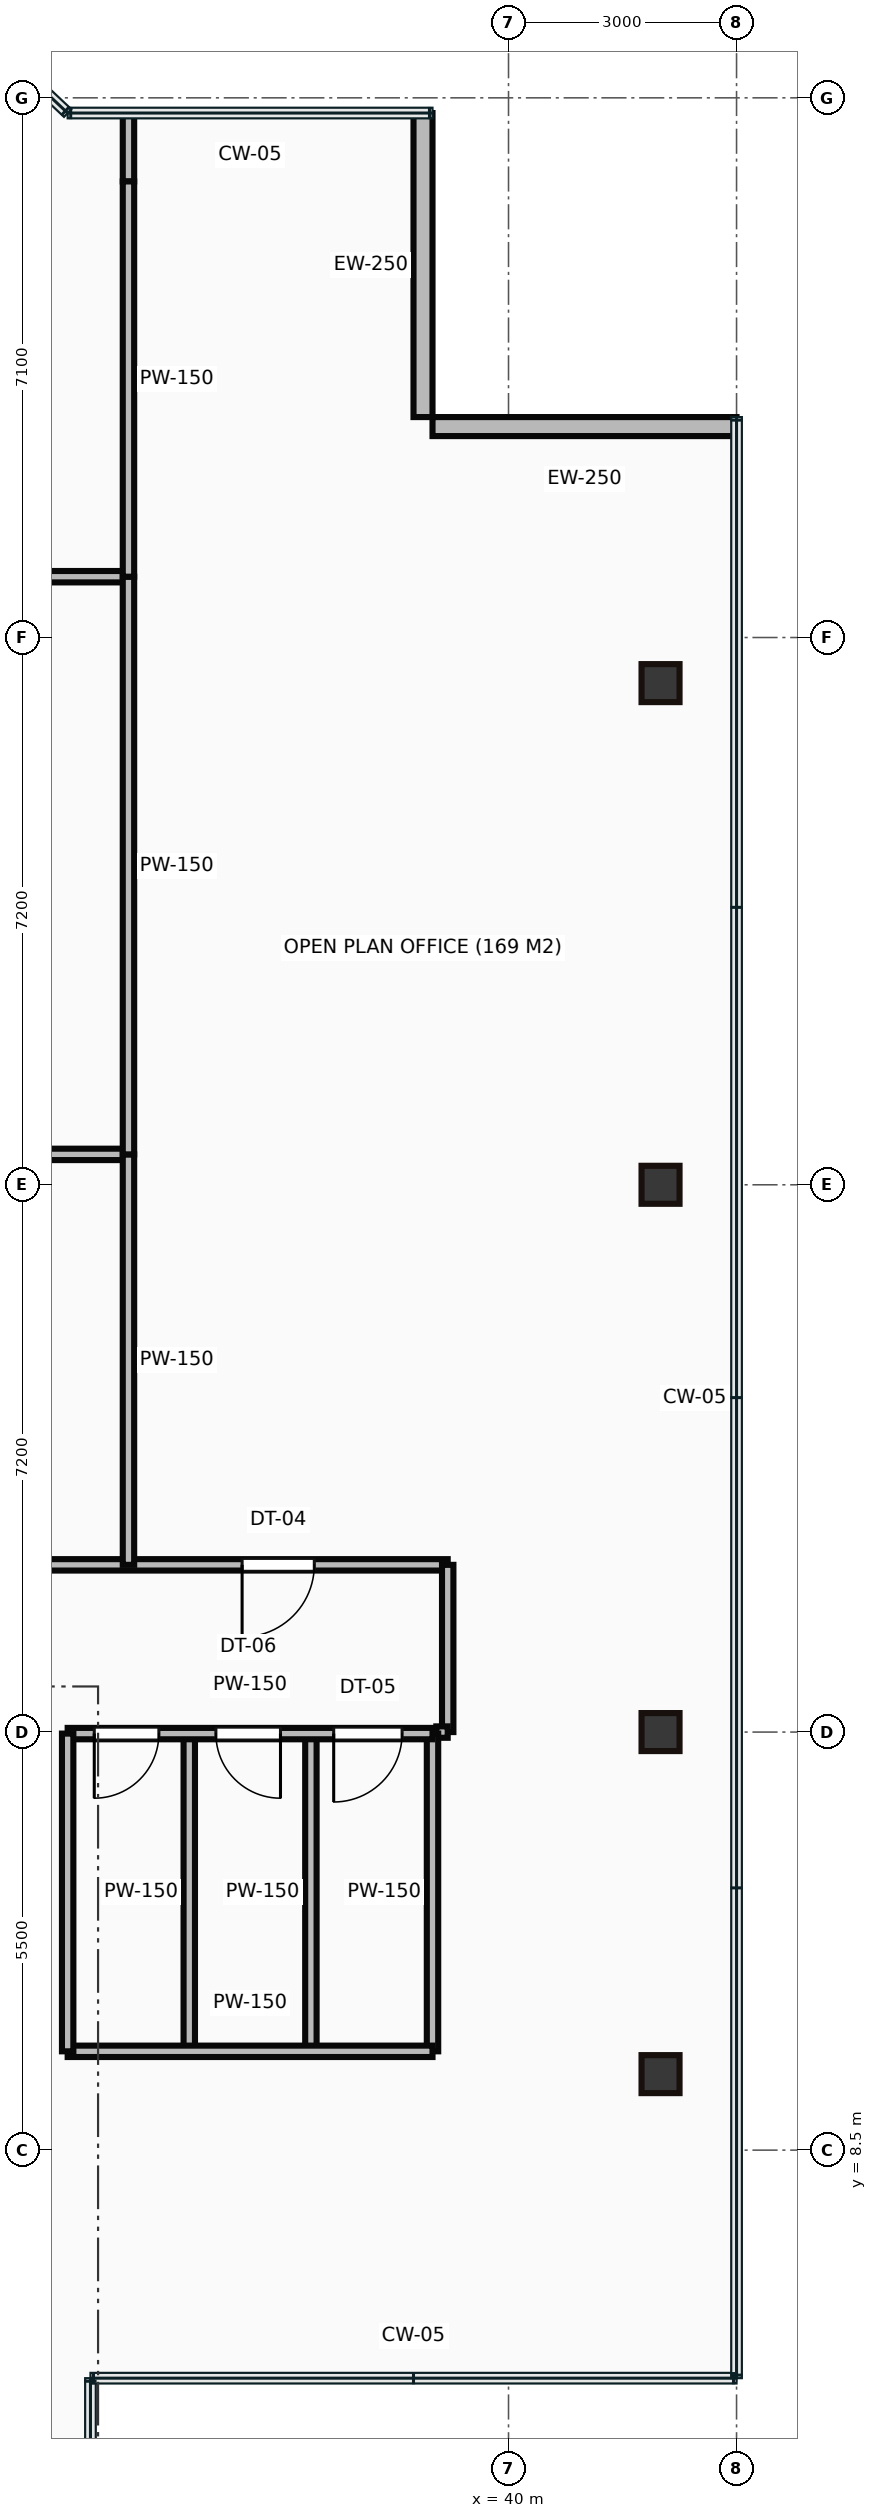
"""IFC4 building model, lengths in metres.
Left out: names, types, materials, properties, quantities, classifications, styles, units other than length and angle.
Written with IfcOpenShell. Run it as: python <this file> out.ifc"""

import sys

from ifc_helpers import new_model, si_unit, direction, frame, frame_2d, origin, origin_2d, place, context, subcontext, project, spatial, rectangle, hollow_rectangle, extrude, source, transform, mapped, element, fill, save


model = new_model("IFC4")
c1 = context("Model", 3, precision=1e-05, world=origin(), true_north=direction((0.0, 1.0)))
c2 = subcontext(c1, "Body", "Model", "MODEL_VIEW")
j1 = project(units=[si_unit("LENGTHUNIT", "METRE"), si_unit("PLANEANGLEUNIT", "RADIAN")], contexts=[c1])
p1 = place(None, origin())
s1 = spatial("IfcSite", under=j1, at=p1, CompositionType="ELEMENT")
p2 = place(p1, origin())
s2 = spatial("IfcBuilding", under=s1, at=p2, CompositionType="ELEMENT")
p3 = place(p2, frame((0.0, 0.0, 277.05)))
s3 = spatial("IfcBuildingStorey", under=s2, at=p3, CompositionType="ELEMENT", Elevation=277.05)
m1 = source(origin(), c2, "Body", "SweptSolid", [
    extrude(hollow_rectangle(XDim=0.5, YDim=0.5, WallThickness=0.022, at=origin_2d()), origin(), (0.0, 0.0, 1.0), 3.65),
])
for number, where, z_axis, x_axis in (
    (1, (42.0, 9.5, 0.0), (0.0, 0.0, 1.0), (1.0, 0.0, 0.0)),
    (2, (42.0, 14.0, 0.0), (0.0, 0.0, 1.0), (1.0, 0.0, 0.0)),
    (3, (42.0, 21.2, 0.0), (0.0, 0.0, 1.0), (1.0, 0.0, 0.0)),
    (4, (42.0, 27.8, 0.0), (0.0, 0.0, 1.0), (1.0, 0.0, 0.0)),
):
    element("IfcColumn", number, at=place(p3, frame(where, z_axis=z_axis, x_axis=x_axis)), inside=s3, PredefinedType="COLUMN", context=c2, shape_type="MappedRepresentation", body=[
        mapped(m1, transform((0.0, 0.0, 0.0))),
    ])
m2 = source(origin(), c2, "Body", "SweptSolid", [
    extrude(rectangle(XDim=4.0, YDim=0.25, at=frame_2d((2.0, 0.0))), origin(), (0.0, 0.0, 1.0), 3.4),
])
for number, where, z_axis, x_axis in (
    (5, (43.0, 31.175, 0.0), (0.0, 0.0, 1.0), (-1.0, 0.0, 0.0)),
    (6, (38.875, 31.3, 0.0), (0.0, 0.0, 1.0), (0.0, 1.0, 0.0)),
):
    element("IfcWall", number, at=place(p3, frame(where, z_axis=z_axis, x_axis=x_axis)), inside=s3, PredefinedType="STANDARD", context=c2, shape_type="MappedRepresentation", body=[
        mapped(m2, transform((0.0, 0.0, 0.0))),
    ])
m3 = source(origin(), c2, "Body", "SweptSolid", [
    extrude(rectangle(XDim=4.8, YDim=0.15, at=frame_2d((2.4, 0.0))), origin(), (0.0, 0.0, 1.0), 2.787),
])
p4 = place(p3, frame((34.2, 13.98, 0.0), z_axis=(0.0, 0.0, 1.0), x_axis=(1.0, 0.0, 0.0)))
e7 = element("IfcWall", 7, at=p4, inside=s3, PredefinedType="PARTITIONING", context=c2, shape_type="MappedRepresentation", body=[
    mapped(m3, transform((0.0, 0.0, 0.0))),
])
p5 = place(p4, frame((0.35, 0.0, 0.0)))
e8 = element("IfcOpeningElement", 8, at=p5, cuts=e7, PredefinedType="OPENING", context=c2, shape_type="SweptSolid", body=[
    extrude(rectangle(XDim=0.85, YDim=2.1, at=frame_2d((0.425, 1.05))), frame((0.0, 0.085, 0.0), z_axis=(0.0, -1.0, 0.0), x_axis=(1.0, 0.0, 0.0)), (0.0, 0.0, 1.0), 0.17),
])
p6 = place(p4, frame((1.95, 0.0, 0.0)))
e9 = element("IfcOpeningElement", 9, at=p6, cuts=e7, PredefinedType="OPENING", context=c2, shape_type="SweptSolid", body=[
    extrude(rectangle(XDim=0.85, YDim=2.1, at=frame_2d((0.425, 1.05))), frame((0.0, 0.085, 0.0), z_axis=(0.0, -1.0, 0.0), x_axis=(1.0, 0.0, 0.0)), (0.0, 0.0, 1.0), 0.17),
])
p7 = place(p4, frame((3.5, 0.0, 0.0)))
e10 = element("IfcOpeningElement", 10, at=p7, cuts=e7, PredefinedType="OPENING", context=c2, shape_type="SweptSolid", body=[
    extrude(rectangle(XDim=0.9, YDim=2.1, at=frame_2d((0.45, 1.05))), frame((0.0, 0.085, 0.0), z_axis=(0.0, -1.0, 0.0), x_axis=(1.0, 0.0, 0.0)), (0.0, 0.0, 1.0), 0.17),
])
m4 = source(origin(), c2, "Body", "SweptSolid", [
    extrude(rectangle(XDim=4.8, YDim=0.15, at=frame_2d((2.4, 0.0))), origin(), (0.0, 0.0, 1.0), 3.4),
])
p8 = place(p3, frame((34.2, 9.8, 0.0), z_axis=(0.0, 0.0, 1.0), x_axis=(1.0, 0.0, 0.0)))
e11 = element("IfcWall", 11, at=p8, inside=s3, PredefinedType="PARTITIONING", context=c2, shape_type="MappedRepresentation", body=[
    mapped(m4, transform((0.0, 0.0, 0.0))),
])
m5 = source(origin(), c2, "Body", "SweptSolid", [
    extrude(rectangle(XDim=4.18, YDim=0.15, at=frame_2d((2.09, 0.0))), origin(), (0.0, 0.0, 1.0), 3.4),
])
for number, where, z_axis, x_axis in (
    (12, (39.0, 9.8, 0.0), (0.0, 0.0, 1.0), (0.0, 1.0, 0.0)),
    (13, (34.2, 9.8, 0.0), (0.0, 0.0, 1.0), (0.0, 1.0, 0.0)),
    (14, (35.8, 9.8, 0.0), (0.0, 0.0, 1.0), (0.0, 1.0, 0.0)),
    (15, (37.4, 9.8, 0.0), (0.0, 0.0, 1.0), (0.0, 1.0, 0.0)),
):
    element("IfcWall", number, at=place(p3, frame(where, z_axis=z_axis, x_axis=x_axis)), inside=s3, PredefinedType="PARTITIONING", context=c2, shape_type="MappedRepresentation", body=[
        mapped(m5, transform((0.0, 0.0, 0.0))),
    ])
m6 = source(origin(), c2, "Body", "SweptSolid", [
    extrude(rectangle(XDim=13.45, YDim=0.15, at=frame_2d((6.725, 0.0))), origin(), (0.0, 0.0, 1.0), 3.4),
])
p9 = place(p3, frame((25.75, 16.2, 0.0), z_axis=(0.0, 0.0, 1.0), x_axis=(1.0, 0.0, 0.0)))
e16 = element("IfcWall", 16, at=p9, inside=s3, PredefinedType="PARTITIONING", context=c2, shape_type="MappedRepresentation", body=[
    mapped(m6, transform((0.0, 0.0, 0.0))),
])
p10 = place(p9, frame((4.28, 0.0, 0.0)))
e17 = element("IfcOpeningElement", 17, at=p10, cuts=e16, PredefinedType="OPENING", context=c2, shape_type="SweptSolid", body=[
    extrude(rectangle(XDim=0.95, YDim=2.15, at=frame_2d((0.475, 1.075))), frame((0.0, 0.085, 0.0), z_axis=(0.0, -1.0, 0.0), x_axis=(1.0, 0.0, 0.0)), (0.0, 0.0, 1.0), 0.17),
])
p11 = place(p9, frame((10.745, 0.0, 0.0)))
e18 = element("IfcOpeningElement", 18, at=p11, cuts=e16, PredefinedType="OPENING", context=c2, shape_type="SweptSolid", body=[
    extrude(rectangle(XDim=0.95, YDim=2.15, at=frame_2d((0.475, 1.075))), frame((0.0, 0.085, 0.0), z_axis=(0.0, -1.0, 0.0), x_axis=(1.0, 0.0, 0.0)), (0.0, 0.0, 1.0), 0.17),
])
m7 = source(origin(), c2, "Body", "SweptSolid", [
    extrude(rectangle(XDim=2.2, YDim=0.15, at=frame_2d((1.1, 0.0))), origin(), (0.0, 0.0, 1.0), 3.4),
])
p12 = place(p3, frame((39.2, 16.2, 0.0), z_axis=(0.0, 0.0, 1.0), x_axis=(0.0, -1.0, 0.0)))
e19 = element("IfcWall", 19, at=p12, inside=s3, PredefinedType="PARTITIONING", context=c2, shape_type="MappedRepresentation", body=[
    mapped(m7, transform((0.0, 0.0, 0.0))),
])
m8 = source(origin(), c2, "Body", "SweptSolid", [
    extrude(rectangle(XDim=0.15, YDim=0.15, at=frame_2d((0.075, 0.0))), origin(), (0.0, 0.0, 1.0), 3.4),
])
p13 = place(p3, frame((39.2, 14.0, 0.0), z_axis=(0.0, 0.0, 1.0), x_axis=(-1.0, 0.0, 0.0)))
e20 = element("IfcWall", 20, at=p13, inside=s3, PredefinedType="PARTITIONING", context=c2, shape_type="MappedRepresentation", body=[
    mapped(m8, transform((0.0, 0.0, 0.0))),
])
m9 = source(origin(), c2, "Body", "SweptSolid", [
    extrude(rectangle(XDim=9.25, YDim=0.15, at=frame_2d((4.625, 0.0))), origin(), (0.0, 0.0, 1.0), 3.4),
])
for number, where, z_axis, x_axis in (
    (21, (25.75, 21.6, 0.0), (0.0, 0.0, 1.0), (1.0, 0.0, 0.0)),
    (22, (35.0, 29.2, 0.0), (0.0, 0.0, 1.0), (-1.0, 0.0, 0.0)),
):
    element("IfcWall", number, at=place(p3, frame(where, z_axis=z_axis, x_axis=x_axis)), inside=s3, PredefinedType="PARTITIONING", context=c2, shape_type="MappedRepresentation", body=[
        mapped(m9, transform((0.0, 0.0, 0.0))),
    ])
m10 = source(origin(), c2, "Body", "SweptSolid", [
    extrude(rectangle(XDim=5.4, YDim=0.15, at=frame_2d((2.7, 0.0))), origin(), (0.0, 0.0, 1.0), 3.4),
])
p14 = place(p3, frame((35.0, 21.6, 0.0), z_axis=(0.0, 0.0, 1.0), x_axis=(0.0, -1.0, 0.0)))
e23 = element("IfcWall", 23, at=p14, inside=s3, PredefinedType="PARTITIONING", context=c2, shape_type="MappedRepresentation", body=[
    mapped(m10, transform((0.0, 0.0, 0.0))),
])
m11 = source(origin(), c2, "Body", "SweptSolid", [
    extrude(rectangle(XDim=7.6, YDim=0.15, at=frame_2d((3.8, 0.0))), origin(), (0.0, 0.0, 1.0), 3.4),
])
p15 = place(p3, frame((35.0, 29.2, 0.0), z_axis=(0.0, 0.0, 1.0), x_axis=(0.0, -1.0, 0.0)))
e24 = element("IfcWall", 24, at=p15, inside=s3, PredefinedType="PARTITIONING", context=c2, shape_type="MappedRepresentation", body=[
    mapped(m11, transform((0.0, 0.0, 0.0))),
])
m12 = source(origin(), c2, "Body", "SweptSolid", [
    extrude(rectangle(XDim=0.88, YDim=0.15, at=frame_2d((0.44, 0.0))), origin(), (0.0, 0.0, 1.0), 3.4),
])
p16 = place(p3, frame((35.0, 35.28, 0.0), z_axis=(0.0, 0.0, 1.0), x_axis=(0.0, -1.0, 0.0)))
e25 = element("IfcWall", 25, at=p16, inside=s3, PredefinedType="PARTITIONING", context=c2, shape_type="MappedRepresentation", body=[
    mapped(m12, transform((0.0, 0.0, 0.0))),
])
m13 = source(origin(), c2, "Body", "SweptSolid", [
    extrude(rectangle(XDim=5.2, YDim=0.15, at=frame_2d((2.6, 0.0))), origin(), (0.0, 0.0, 1.0), 3.4),
])
p17 = place(p3, frame((35.0, 34.4, 0.0), z_axis=(0.0, 0.0, 1.0), x_axis=(0.0, -1.0, 0.0)))
e26 = element("IfcWall", 26, at=p17, inside=s3, PredefinedType="PARTITIONING", context=c2, shape_type="MappedRepresentation", body=[
    mapped(m13, transform((0.0, 0.0, 0.0))),
])
m14 = source(origin(), c2, "Body", "SweptSolid", [
    extrude(rectangle(XDim=0.85, YDim=2.1, at=frame_2d((0.425, 1.05))), frame((0.0, 0.025, 0.0), z_axis=(0.0, -1.0, 0.0), x_axis=(1.0, 0.0, 0.0)), (0.0, 0.0, 1.0), 0.05),
])
p18 = place(p5, frame((0.85, 0.0, 0.0), z_axis=(0.0, 0.0, 1.0), x_axis=(-1.0, 0.0, 0.0)))
e27 = element("IfcDoor", 27, at=p18, inside=s3, OperationType="SINGLE_SWING_LEFT", PredefinedType="DOOR", context=c2, shape_type="MappedRepresentation", body=[
    mapped(m14, transform((0.0, 0.0, 0.0))),
])
fill(e8, e27)
p19 = place(p6, frame((0.85, 0.0, 0.0), z_axis=(0.0, 0.0, 1.0), x_axis=(-1.0, 0.0, 0.0)))
e28 = element("IfcDoor", 28, at=p19, inside=s3, OperationType="SINGLE_SWING_RIGHT", PredefinedType="DOOR", context=c2, shape_type="MappedRepresentation", body=[
    mapped(m14, transform((0.0, 0.0, 0.0))),
])
fill(e9, e28)
m15 = source(origin(), c2, "Body", "SweptSolid", [
    extrude(rectangle(XDim=0.9, YDim=2.1, at=frame_2d((0.45, 1.05))), frame((0.0, 0.025, 0.0), z_axis=(0.0, -1.0, 0.0), x_axis=(1.0, 0.0, 0.0)), (0.0, 0.0, 1.0), 0.05),
])
p20 = place(p7, frame((0.9, 0.0, 0.0), z_axis=(0.0, 0.0, 1.0), x_axis=(-1.0, 0.0, 0.0)))
e29 = element("IfcDoor", 29, at=p20, inside=s3, OperationType="SINGLE_SWING_LEFT", PredefinedType="DOOR", context=c2, shape_type="MappedRepresentation", body=[
    mapped(m15, transform((0.0, 0.0, 0.0))),
])
fill(e10, e29)
m16 = source(origin(), c2, "Body", "SweptSolid", [
    extrude(rectangle(XDim=0.95, YDim=2.15, at=frame_2d((0.475, 1.075))), frame((0.0, 0.025, 0.0), z_axis=(0.0, -1.0, 0.0), x_axis=(1.0, 0.0, 0.0)), (0.0, 0.0, 1.0), 0.05),
])
p21 = place(p11, origin())
e30 = element("IfcDoor", 30, at=p21, inside=s3, OperationType="SINGLE_SWING_LEFT", PredefinedType="DOOR", context=c2, shape_type="MappedRepresentation", body=[
    mapped(m16, transform((0.0, 0.0, 0.0))),
])
fill(e18, e30)
save(model, sys.argv[1])
